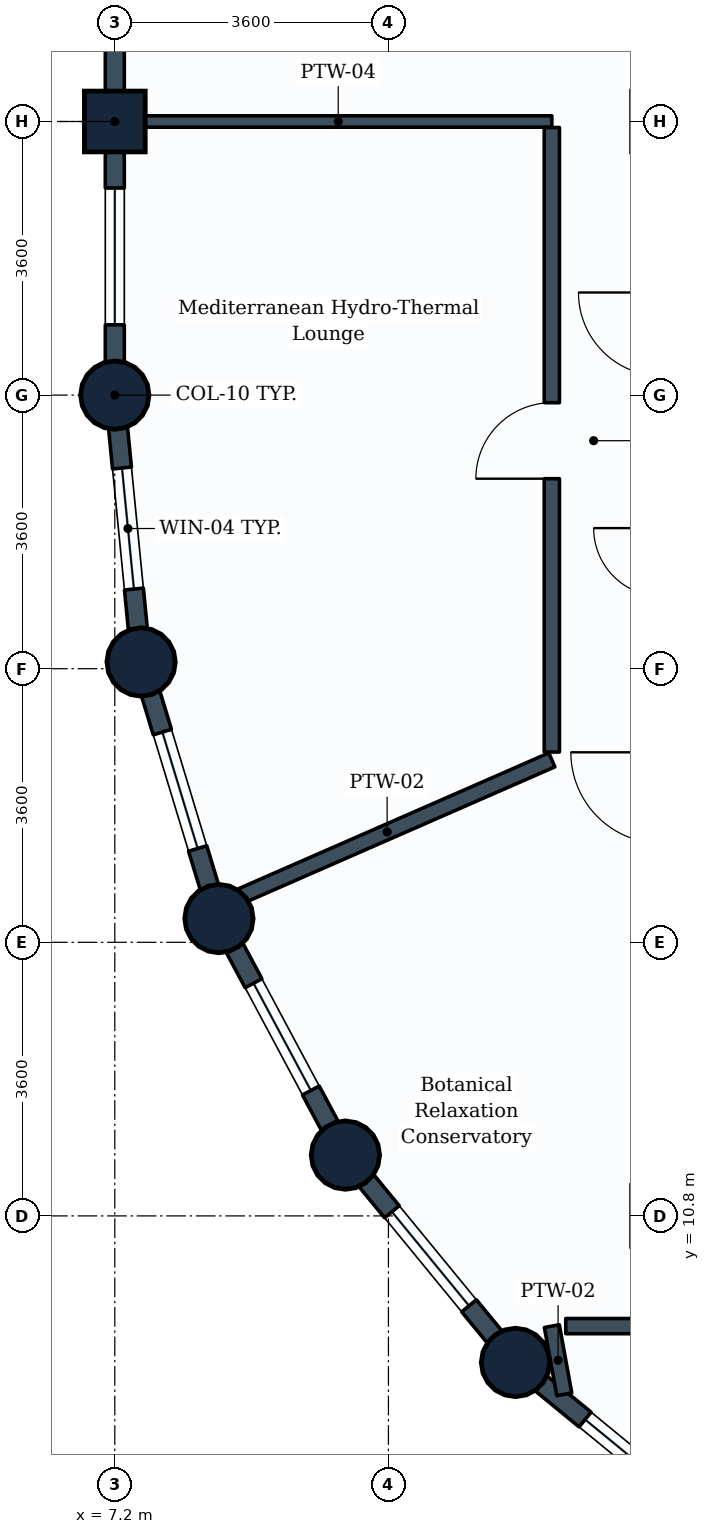
"""IFC4 building model, lengths in metres.
Left out: names, types, materials, properties, quantities, classifications, styles, units other than length and angle.
Written with IfcOpenShell. Run it as: python <this file> out.ifc"""

import sys

from ifc_helpers import new_model, si_unit, direction, frame, frame_2d, origin, origin_2d, place, context, subcontext, project, spatial, rectangle, circle, extrude, element, fill, save


model = new_model("IFC4")
c1 = context("Model", 3, precision=1e-05, world=origin(), true_north=direction((0.0, 1.0)))
c2 = subcontext(c1, "Body", "Model", "MODEL_VIEW")
j1 = project(units=[si_unit("LENGTHUNIT", "METRE"), si_unit("PLANEANGLEUNIT", "RADIAN")], contexts=[c1])
p1 = place(None, origin())
s1 = spatial("IfcSite", under=j1, at=p1, CompositionType="ELEMENT")
p2 = place(p1, origin())
s2 = spatial("IfcBuilding", under=s1, at=p2, CompositionType="ELEMENT")
p3 = place(p2, frame((0.0, 0.0, 235.4)))
s3 = spatial("IfcBuildingStorey", under=s2, at=p3, CompositionType="ELEMENT", Elevation=235.4)
p4 = place(p3, frame((7.2, 21.6, 0.0), z_axis=(0.0, 0.0, 1.0), x_axis=(1.0, 0.0, 0.0)))
e1 = element("IfcColumn", 1, at=p4, inside=s3, PredefinedType="COLUMN", context=c2, shape_type="SweptSolid", body=[
    extrude(circle(Radius=0.45, at=origin_2d()), origin(), (0.0, 0.0, 1.0), 3.6),
])
p5 = place(p3, frame((7.2, 25.2, 0.0), z_axis=(0.0, 0.0, 1.0), x_axis=(0.0, 1.0, 0.0)))
e2 = element("IfcColumn", 2, at=p5, inside=s3, PredefinedType="COLUMN", context=c2, shape_type="SweptSolid", body=[
    extrude(rectangle(XDim=0.8, YDim=0.8, at=origin_2d()), origin(), (0.0, 0.0, 1.0), 3.6),
])
for number, where, z_axis, x_axis in (
    (3, (7.546, 18.088, 0.0), (0.0, 0.0, 1.0), (1.0, 0.0, 0.0)),
    (4, (8.57, 14.712, 0.0), (0.0, 0.0, 1.0), (1.0, 0.0, 0.0)),
    (5, (10.234, 11.6, 0.0), (0.0, 0.0, 1.0), (1.0, 0.0, 0.0)),
    (6, (12.472, 8.872, 0.0), (0.0, 0.0, 1.0), (1.0, 0.0, 0.0)),
):
    element("IfcColumn", number, at=place(p3, frame(where, z_axis=z_axis, x_axis=x_axis)), inside=s3, PredefinedType="COLUMN", context=c2, shape_type="SweptSolid", body=[
        extrude(circle(Radius=0.45, at=origin_2d()), origin(), (0.0, 0.0, 1.0), 3.6),
    ])
p6 = place(p3, frame((7.2, 25.2, 0.0), z_axis=(0.0, 0.0, 1.0), x_axis=(0.0, 1.0, 0.0)))
e7 = element("IfcWall", 7, at=p6, inside=s3, PredefinedType="STANDARD", context=c2, shape_type="SweptSolid", body=[
    extrude(rectangle(XDim=3.6, YDim=0.25, at=frame_2d((1.8, 0.0))), origin(), (0.0, 0.0, 1.0), 2.83),
])
p7 = place(p3, frame((7.2, 21.6, 0.0), z_axis=(0.0, 0.0, 1.0), x_axis=(0.0, 1.0, 0.0)))
e8 = element("IfcWall", 8, at=p7, inside=s3, PredefinedType="STANDARD", context=c2, shape_type="SweptSolid", body=[
    extrude(rectangle(XDim=3.6, YDim=0.25, at=frame_2d((1.8, 0.0))), origin(), (0.0, 0.0, 1.0), 2.83),
])
p8 = place(p7, frame((0.925, 0.0, 0.85)))
e9 = element("IfcOpeningElement", 9, at=p8, cuts=e8, PredefinedType="OPENING", context=c2, shape_type="SweptSolid", body=[
    extrude(rectangle(XDim=1.8, YDim=1.35, at=frame_2d((0.9, 0.675))), frame((0.0, 0.135, 0.0), z_axis=(0.0, -1.0, 0.0), x_axis=(1.0, 0.0, 0.0)), (0.0, 0.0, 1.0), 0.27),
])
p9 = place(p3, frame((7.546, 18.088, 0.0), z_axis=(0.0, 0.0, 1.0), x_axis=(-0.09802417461, 0.995184033831, 0.0)))
e10 = element("IfcWall", 10, at=p9, inside=s3, PredefinedType="STANDARD", context=c2, shape_type="SweptSolid", body=[
    extrude(rectangle(XDim=3.529, YDim=0.25, at=frame_2d((1.765, 0.0))), origin(), (0.0, 0.0, 1.0), 2.83),
])
p10 = place(p9, frame((0.965, 0.0, 0.85)))
e11 = element("IfcOpeningElement", 11, at=p10, cuts=e10, PredefinedType="OPENING", context=c2, shape_type="SweptSolid", body=[
    extrude(rectangle(XDim=1.6, YDim=1.35, at=frame_2d((0.8, 0.675))), frame((0.0, 0.135, 0.0), z_axis=(0.0, -1.0, 0.0), x_axis=(1.0, 0.0, 0.0)), (0.0, 0.0, 1.0), 0.27),
])
p11 = place(p3, frame((8.57, 14.712, 0.0), z_axis=(0.0, 0.0, 1.0), x_axis=(-0.290305086481, 0.956934144423, 0.0)))
e12 = element("IfcWall", 12, at=p11, inside=s3, PredefinedType="STANDARD", context=c2, shape_type="SweptSolid", body=[
    extrude(rectangle(XDim=3.528, YDim=0.25, at=frame_2d((1.764, 0.0))), origin(), (0.0, 0.0, 1.0), 2.83),
])
p12 = place(p11, frame((0.964, 0.0, 0.85)))
e13 = element("IfcOpeningElement", 13, at=p12, cuts=e12, PredefinedType="OPENING", context=c2, shape_type="SweptSolid", body=[
    extrude(rectangle(XDim=1.6, YDim=1.35, at=frame_2d((0.8, 0.675))), frame((0.0, 0.135, 0.0), z_axis=(0.0, -1.0, 0.0), x_axis=(1.0, 0.0, 0.0)), (0.0, 0.0, 1.0), 0.27),
])
p13 = place(p3, frame((10.234, 11.6, 0.0), z_axis=(0.0, 0.0, 1.0), x_axis=(-0.47151087309, 0.881860247748, 0.0)))
e14 = element("IfcWall", 14, at=p13, inside=s3, PredefinedType="STANDARD", context=c2, shape_type="SweptSolid", body=[
    extrude(rectangle(XDim=3.529, YDim=0.25, at=frame_2d((1.764, 0.0))), origin(), (0.0, 0.0, 1.0), 2.83),
])
p14 = place(p13, frame((0.964, 0.0, 0.85)))
e15 = element("IfcOpeningElement", 15, at=p14, cuts=e14, PredefinedType="OPENING", context=c2, shape_type="SweptSolid", body=[
    extrude(rectangle(XDim=1.6, YDim=1.35, at=frame_2d((0.8, 0.675))), frame((0.0, 0.135, 0.0), z_axis=(0.0, -1.0, 0.0), x_axis=(1.0, 0.0, 0.0)), (0.0, 0.0, 1.0), 0.27),
])
p15 = place(p3, frame((12.472, 8.872, 0.0), z_axis=(0.0, 0.0, 1.0), x_axis=(-0.634258295121, 0.773121216285, 0.0)))
e16 = element("IfcWall", 16, at=p15, inside=s3, PredefinedType="STANDARD", context=c2, shape_type="SweptSolid", body=[
    extrude(rectangle(XDim=3.529, YDim=0.25, at=frame_2d((1.764, 0.0))), origin(), (0.0, 0.0, 1.0), 2.83),
])
p16 = place(p15, frame((0.964, 0.0, 0.85)))
e17 = element("IfcOpeningElement", 17, at=p16, cuts=e16, PredefinedType="OPENING", context=c2, shape_type="SweptSolid", body=[
    extrude(rectangle(XDim=1.6, YDim=1.35, at=frame_2d((0.8, 0.675))), frame((0.0, 0.135, 0.0), z_axis=(0.0, -1.0, 0.0), x_axis=(1.0, 0.0, 0.0)), (0.0, 0.0, 1.0), 0.27),
])
p17 = place(p3, frame((15.2, 6.634, 0.0), z_axis=(0.0, 0.0, 1.0), x_axis=(-0.773121216285, 0.634258295121, 0.0)))
e18 = element("IfcWall", 18, at=p17, inside=s3, PredefinedType="STANDARD", context=c2, shape_type="SweptSolid", body=[
    extrude(rectangle(XDim=3.529, YDim=0.25, at=frame_2d((1.764, 0.0))), origin(), (0.0, 0.0, 1.0), 2.83),
])
p18 = place(p17, frame((0.744, 0.0, 0.85)))
e19 = element("IfcOpeningElement", 19, at=p18, cuts=e18, PredefinedType="OPENING", context=c2, shape_type="SweptSolid", body=[
    extrude(rectangle(XDim=1.6, YDim=1.35, at=frame_2d((0.8, 0.675))), frame((0.0, 0.135, 0.0), z_axis=(0.0, -1.0, 0.0), x_axis=(1.0, 0.0, 0.0)), (0.0, 0.0, 1.0), 0.27),
])
p19 = place(p3, frame((7.329, 25.2, 0.0), z_axis=(0.0, 0.0, 1.0), x_axis=(1.0, 0.0, 0.0)))
e20 = element("IfcWall", 20, at=p19, inside=s3, PredefinedType="PARTITIONING", context=c2, shape_type="SweptSolid", body=[
    extrude(rectangle(XDim=5.621, YDim=0.15, at=frame_2d((2.811, 0.0))), origin(), (0.0, 0.0, 1.0), 3.335),
])
p20 = place(p3, frame((12.95, 16.8, 0.0), z_axis=(0.0, 0.0, 1.0), x_axis=(-0.916090997314, -0.400970428635, 0.0)))
e21 = element("IfcWall", 21, at=p20, inside=s3, PredefinedType="PARTITIONING", context=c2, shape_type="SweptSolid", body=[
    extrude(rectangle(XDim=4.731, YDim=0.2, at=frame_2d((2.365, 0.0))), origin(), (0.0, 0.0, 1.0), 2.83),
])
p21 = place(p3, frame((12.95, 9.35, 0.0), z_axis=(0.0, 0.0, 1.0), x_axis=(0.179827308786, -0.983698195086, 0.0)))
e22 = element("IfcWall", 22, at=p21, inside=s3, PredefinedType="PARTITIONING", context=c2, shape_type="SweptSolid", body=[
    extrude(rectangle(XDim=0.912, YDim=0.2, at=frame_2d((0.456, 0.0))), origin(), (0.0, 0.0, 1.0), 2.83),
])
p22 = place(p3, frame((12.95, 16.904, 0.0), z_axis=(0.0, 0.0, 1.0), x_axis=(0.0, 1.0, 0.0)))
e23 = element("IfcWall", 23, at=p22, inside=s3, PredefinedType="PARTITIONING", context=c2, shape_type="SweptSolid", body=[
    extrude(rectangle(XDim=8.217, YDim=0.2, at=frame_2d((4.108, 0.0))), origin(), (0.0, 0.0, 1.0), 3.02),
])
p23 = place(p22, frame((3.596, 0.0, 0.0)))
e24 = element("IfcOpeningElement", 24, at=p23, cuts=e23, PredefinedType="OPENING", context=c2, shape_type="SweptSolid", body=[
    extrude(rectangle(XDim=1.0, YDim=2.1, at=frame_2d((0.5, 1.05))), frame((0.0, 0.11, 0.0), z_axis=(0.0, -1.0, 0.0), x_axis=(1.0, 0.0, 0.0)), (0.0, 0.0, 1.0), 0.22),
])
p24 = place(p3, frame((13.133, 9.35, 0.0), z_axis=(0.0, 0.0, 1.0), x_axis=(1.0, 0.0, 0.0)))
e25 = element("IfcWall", 25, at=p24, inside=s3, PredefinedType="PARTITIONING", context=c2, shape_type="SweptSolid", body=[
    extrude(rectangle(XDim=7.163, YDim=0.2, at=frame_2d((3.582, 0.0))), origin(), (0.0, 0.0, 1.0), 3.02),
])
p25 = place(p24, frame((4.078, 0.0, 0.0)))
e26 = element("IfcOpeningElement", 26, at=p25, cuts=e25, PredefinedType="OPENING", context=c2, shape_type="SweptSolid", body=[
    extrude(rectangle(XDim=1.0, YDim=2.1, at=frame_2d((0.5, 1.05))), frame((0.0, 0.11, 0.0), z_axis=(0.0, -1.0, 0.0), x_axis=(1.0, 0.0, 0.0)), (0.0, 0.0, 1.0), 0.22),
])
p26 = place(p8, origin())
e27 = element("IfcWindow", 27, at=p26, inside=s3, PartitioningType="SINGLE_PANEL", PredefinedType="WINDOW", context=c2, shape_type="SweptSolid", body=[
    extrude(rectangle(XDim=1.8, YDim=1.35, at=frame_2d((0.9, 0.675))), frame((0.0, 0.03, 0.0), z_axis=(0.0, -1.0, 0.0), x_axis=(1.0, 0.0, 0.0)), (0.0, 0.0, 1.0), 0.06),
])
fill(e9, e27)
p27 = place(p10, origin())
e28 = element("IfcWindow", 28, at=p27, inside=s3, PartitioningType="SINGLE_PANEL", PredefinedType="WINDOW", context=c2, shape_type="SweptSolid", body=[
    extrude(rectangle(XDim=1.6, YDim=1.35, at=frame_2d((0.8, 0.675))), frame((0.0, 0.03, 0.0), z_axis=(0.0, -1.0, 0.0), x_axis=(1.0, 0.0, 0.0)), (0.0, 0.0, 1.0), 0.06),
])
fill(e11, e28)
p28 = place(p12, origin())
e29 = element("IfcWindow", 29, at=p28, inside=s3, PartitioningType="SINGLE_PANEL", PredefinedType="WINDOW", context=c2, shape_type="SweptSolid", body=[
    extrude(rectangle(XDim=1.6, YDim=1.35, at=frame_2d((0.8, 0.675))), frame((0.0, 0.03, 0.0), z_axis=(0.0, -1.0, 0.0), x_axis=(1.0, 0.0, 0.0)), (0.0, 0.0, 1.0), 0.06),
])
fill(e13, e29)
p29 = place(p14, origin())
e30 = element("IfcWindow", 30, at=p29, inside=s3, PartitioningType="SINGLE_PANEL", PredefinedType="WINDOW", context=c2, shape_type="SweptSolid", body=[
    extrude(rectangle(XDim=1.6, YDim=1.35, at=frame_2d((0.8, 0.675))), frame((0.0, 0.03, 0.0), z_axis=(0.0, -1.0, 0.0), x_axis=(1.0, 0.0, 0.0)), (0.0, 0.0, 1.0), 0.06),
])
fill(e15, e30)
p30 = place(p16, origin())
e31 = element("IfcWindow", 31, at=p30, inside=s3, PartitioningType="SINGLE_PANEL", PredefinedType="WINDOW", context=c2, shape_type="SweptSolid", body=[
    extrude(rectangle(XDim=1.6, YDim=1.35, at=frame_2d((0.8, 0.675))), frame((0.0, 0.03, 0.0), z_axis=(0.0, -1.0, 0.0), x_axis=(1.0, 0.0, 0.0)), (0.0, 0.0, 1.0), 0.06),
])
fill(e17, e31)
p31 = place(p18, origin())
e32 = element("IfcWindow", 32, at=p31, inside=s3, PartitioningType="SINGLE_PANEL", PredefinedType="WINDOW", context=c2, shape_type="SweptSolid", body=[
    extrude(rectangle(XDim=1.6, YDim=1.35, at=frame_2d((0.8, 0.675))), frame((0.0, 0.03, 0.0), z_axis=(0.0, -1.0, 0.0), x_axis=(1.0, 0.0, 0.0)), (0.0, 0.0, 1.0), 0.06),
])
fill(e19, e32)
p32 = place(p23, origin())
e33 = element("IfcDoor", 33, at=p32, inside=s3, OperationType="SINGLE_SWING_LEFT", PredefinedType="DOOR", context=c2, shape_type="SweptSolid", body=[
    extrude(rectangle(XDim=1.0, YDim=2.1, at=frame_2d((0.5, 1.05))), frame((0.0, 0.025, 0.0), z_axis=(0.0, -1.0, 0.0), x_axis=(1.0, 0.0, 0.0)), (0.0, 0.0, 1.0), 0.05),
])
fill(e24, e33)
save(model, sys.argv[1])
